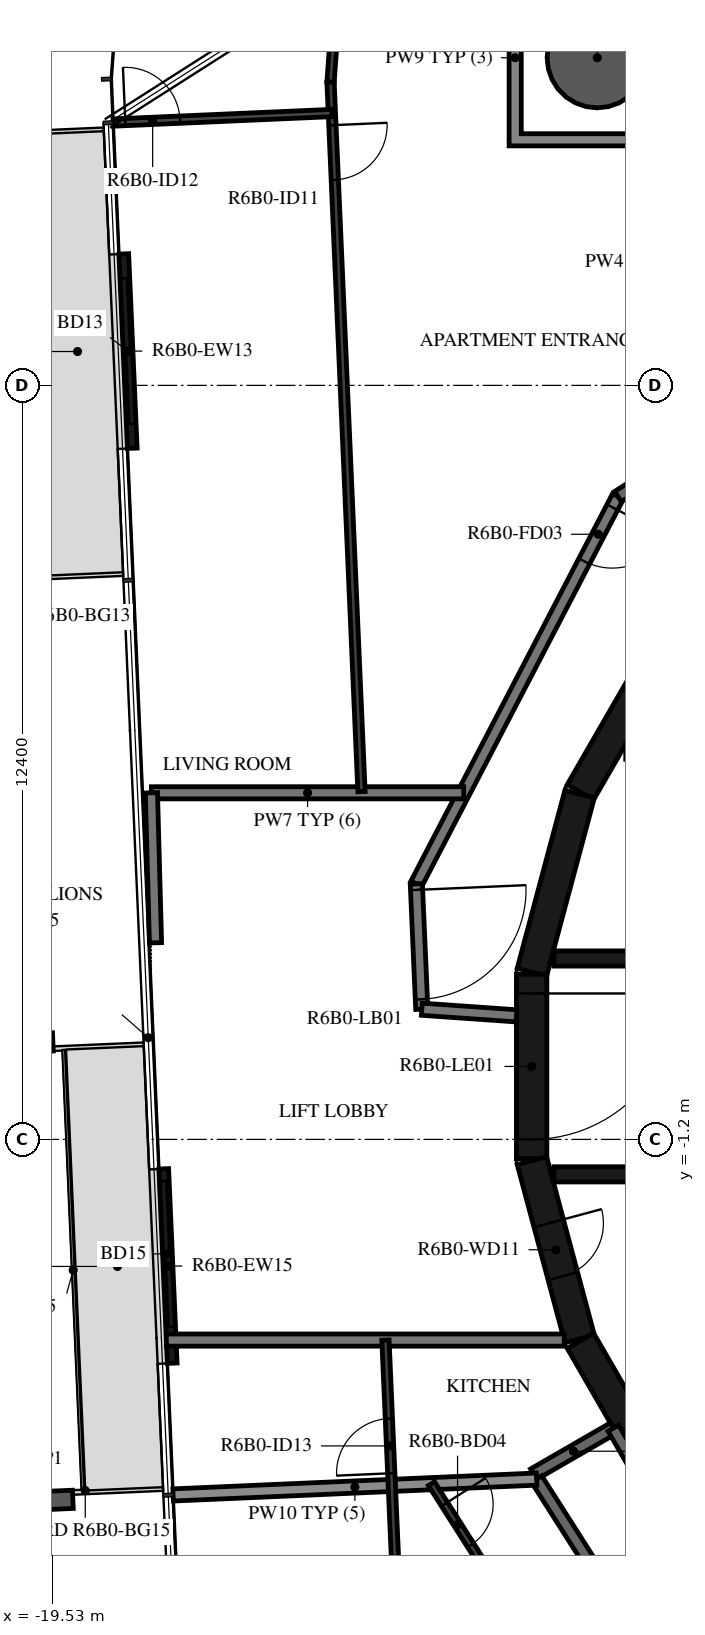
"""IFC4 building model, lengths in metres.
Left out: names, types, materials, properties, quantities, classifications, styles, units other than length and angle.
Written with IfcOpenShell. Run it as: python <this file> out.ifc"""

import sys

from ifc_helpers import new_model, si_unit, direction, frame, frame_2d, origin, origin_2d, place, context, subcontext, project, spatial, polyline, rectangle, hollow_circle, i_section, outline, extrude, element, fill, save


model = new_model("IFC4")
c1 = context("Model", 3, precision=1e-05, world=origin(), true_north=direction((0.0, 1.0)))
c2 = subcontext(c1, "Body", "Model", "MODEL_VIEW")
j1 = project(units=[si_unit("LENGTHUNIT", "METRE"), si_unit("PLANEANGLEUNIT", "RADIAN")], contexts=[c1])
p1 = place(None, origin())
s1 = spatial("IfcSite", under=j1, at=p1, CompositionType="ELEMENT")
p2 = place(p1, origin())
s2 = spatial("IfcBuilding", under=s1, at=p2, CompositionType="ELEMENT")
p3 = place(p2, frame((0.0, 0.0, 240.7)))
s3 = spatial("IfcBuildingStorey", under=s2, at=p3, CompositionType="ELEMENT", Elevation=240.7)
p4 = place(p3, frame((-10.568, 16.588, -0.38), z_axis=(0.0, 0.0, 1.0), x_axis=(1.0, 0.0, 0.0)))
e1 = element("IfcColumn", 1, at=p4, inside=s3, PredefinedType="COLUMN", context=c2, shape_type="SweptSolid", body=[
    extrude(hollow_circle(Radius=0.825, WallThickness=0.04, at=origin_2d()), origin(), (0.0, 0.0, 1.0), 3.5),
])
for number, where, z_axis, x_axis in (
    (2, (-19.97, 0.384, -0.38), (0.0, 0.0, 1.0), (-0.044, 0.999, 0.0)),
    (3, (-19.642, -7.139, -0.38), (0.0, 0.0, 1.0), (-0.044, 0.999, 0.0)),
):
    element("IfcColumn", number, at=place(p3, frame(where, z_axis=z_axis, x_axis=x_axis)), inside=s3, PredefinedType="COLUMN", context=c2, shape_type="SweptSolid", body=[
        extrude(i_section(OverallWidth=0.3, OverallDepth=0.9, WebThickness=0.019, FlangeThickness=0.035, FilletRadius=0.03, at=origin_2d()), origin(), (0.0, 0.0, 1.0), 3.5),
    ])
p5 = place(p3, frame((-18.355, 13.362, 0.0), z_axis=(0.0, 0.0, 1.0), x_axis=(0.043639181999, -0.999047357133, 0.0)))
e4 = element("IfcWall", 4, at=p5, inside=s3, PredefinedType="STANDARD", context=c2, shape_type="SweptSolid", body=[
    extrude(rectangle(XDim=3.2, YDim=0.16, at=frame_2d((1.6, 0.0))), origin(), (0.0, 0.0, 1.0), 3.12),
])
p6 = place(p5, frame((0.4, 0.0, 0.0)))
e5 = element("IfcOpeningElement", 5, at=p6, cuts=e4, PredefinedType="OPENING", context=c2, shape_type="SweptSolid", body=[
    extrude(rectangle(XDim=2.4, YDim=2.4, at=frame_2d((1.2, 1.2))), frame((0.0, 0.09, 0.0), z_axis=(0.0, -1.0, 0.0), x_axis=(1.0, 0.0, 0.0)), (0.0, 0.0, 1.0), 0.18),
])
p7 = place(p3, frame((-17.698, -1.684, 0.0), z_axis=(0.0, 0.0, 1.0), x_axis=(0.043639181999, -0.999047357133, 0.0)))
e6 = element("IfcWall", 6, at=p7, inside=s3, PredefinedType="STANDARD", context=c2, shape_type="SweptSolid", body=[
    extrude(rectangle(XDim=3.2, YDim=0.16, at=frame_2d((1.6, 0.0))), origin(), (0.0, 0.0, 1.0), 3.12),
])
p8 = place(p7, frame((0.2, 0.0, 0.0)))
e7 = element("IfcOpeningElement", 7, at=p8, cuts=e6, PredefinedType="OPENING", context=c2, shape_type="SweptSolid", body=[
    extrude(rectangle(XDim=2.4, YDim=2.4, at=frame_2d((1.2, 1.2))), frame((0.0, 0.09, 0.0), z_axis=(0.0, -1.0, 0.0), x_axis=(1.0, 0.0, 0.0)), (0.0, 0.0, 1.0), 0.18),
])
for number, where, z_axis, x_axis in (
    (8, (-9.329, 7.137, 0.0), (0.0, 0.0, 1.0), (-0.5, -0.866, 0.0)),
    (9, (-10.858, 4.479, 0.0), (0.0, 0.0, 1.0), (-0.259, -0.966, 0.0)),
):
    element("IfcWall", number, at=place(p3, frame(where, z_axis=z_axis, x_axis=x_axis)), inside=s3, PredefinedType="SHEAR", context=c2, shape_type="SweptSolid", body=[
        extrude(rectangle(XDim=3.033, YDim=0.5, at=frame_2d((1.516, 0.0))), origin(), (0.0, 0.0, 1.0), 3.12),
    ])
p9 = place(p3, frame((-11.647, 1.516, 0.0), z_axis=(0.0, 0.0, 1.0), x_axis=(0.0, -1.0, 0.0)))
e10 = element("IfcWall", 10, at=p9, inside=s3, PredefinedType="SHEAR", context=c2, shape_type="SweptSolid", body=[
    extrude(rectangle(XDim=3.033, YDim=0.5, at=frame_2d((1.516, 0.0))), origin(), (0.0, 0.0, 1.0), 3.12),
])
p10 = place(p9, frame((0.316, 0.0, 0.0)))
e11 = element("IfcOpeningElement", 11, at=p10, cuts=e10, PredefinedType="OPENING", context=c2, shape_type="SweptSolid", body=[
    extrude(rectangle(XDim=2.4, YDim=2.1, at=frame_2d((1.2, 1.05))), frame((0.0, 0.26, 0.0), z_axis=(0.0, -1.0, 0.0), x_axis=(1.0, 0.0, 0.0)), (0.0, 0.0, 1.0), 0.52),
])
p11 = place(p3, frame((-11.643, -1.55, 0.0), z_axis=(0.0, 0.0, 1.0), x_axis=(0.258734743916, -0.965948410781, 0.0)))
e12 = element("IfcWall", 12, at=p11, inside=s3, PredefinedType="SHEAR", context=c2, shape_type="SweptSolid", body=[
    extrude(rectangle(XDim=3.033, YDim=0.5, at=frame_2d((1.516, 0.0))), origin(), (0.0, 0.0, 1.0), 3.12),
])
p12 = place(p11, frame((1.066, 0.0, 0.0)))
e13 = element("IfcOpeningElement", 13, at=p12, cuts=e12, PredefinedType="OPENING", context=c2, shape_type="SweptSolid", body=[
    extrude(rectangle(XDim=0.9, YDim=2.1, at=frame_2d((0.45, 1.05))), frame((0.0, 0.26, 0.0), z_axis=(0.0, -1.0, 0.0), x_axis=(1.0, 0.0, 0.0)), (0.0, 0.0, 1.0), 0.52),
])
p13 = place(p3, frame((-10.845, -4.51, 0.0), z_axis=(0.0, 0.0, 1.0), x_axis=(0.500087131594, -0.865975092491, 0.0)))
e14 = element("IfcWall", 14, at=p13, inside=s3, PredefinedType="SHEAR", context=c2, shape_type="SweptSolid", body=[
    extrude(rectangle(XDim=3.033, YDim=0.5, at=frame_2d((1.516, 0.0))), origin(), (0.0, 0.0, 1.0), 3.12),
])
p14 = place(p3, frame((-11.28, 1.775, 0.0), z_axis=(0.0, 0.0, 1.0), x_axis=(1.0, 0.0, 0.0)))
e15 = element("IfcWall", 15, at=p14, inside=s3, PredefinedType="SHEAR", context=c2, shape_type="SweptSolid", body=[
    extrude(rectangle(XDim=14.38, YDim=0.25, at=frame_2d((7.19, 0.0))), origin(), (0.0, 0.0, 1.0), 3.12),
])
p15 = place(p14, frame((10.73, 0.0, 0.0)))
e16 = element("IfcOpeningElement", 16, at=p15, cuts=e15, PredefinedType="OPENING", context=c2, shape_type="SweptSolid", body=[
    extrude(rectangle(XDim=1.1, YDim=2.1, at=frame_2d((0.55, 1.05))), frame((0.0, 0.135, 0.0), z_axis=(0.0, -1.0, 0.0), x_axis=(1.0, 0.0, 0.0)), (0.0, 0.0, 1.0), 0.27),
])
p16 = place(p14, frame((12.88, 0.0, 0.0)))
e17 = element("IfcOpeningElement", 17, at=p16, cuts=e15, PredefinedType="OPENING", context=c2, shape_type="SweptSolid", body=[
    extrude(rectangle(XDim=1.1, YDim=2.1, at=frame_2d((0.55, 1.05))), frame((0.0, 0.135, 0.0), z_axis=(0.0, -1.0, 0.0), x_axis=(1.0, 0.0, 0.0)), (0.0, 0.0, 1.0), 0.27),
])
p17 = place(p14, frame((3.305, 0.0, 0.0)))
e18 = element("IfcOpeningElement", 18, at=p17, cuts=e15, PredefinedType="OPENING", context=c2, shape_type="SweptSolid", body=[
    extrude(rectangle(XDim=0.9, YDim=2.1, at=frame_2d((0.45, 1.05))), frame((0.0, 0.135, 0.0), z_axis=(0.0, -1.0, 0.0), x_axis=(1.0, 0.0, 0.0)), (0.0, 0.0, 1.0), 0.27),
])
p18 = place(p14, frame((7.605, 0.0, 0.0)))
e19 = element("IfcOpeningElement", 19, at=p18, cuts=e15, PredefinedType="OPENING", context=c2, shape_type="SweptSolid", body=[
    extrude(rectangle(XDim=0.9, YDim=2.1, at=frame_2d((0.45, 1.05))), frame((0.0, 0.135, 0.0), z_axis=(0.0, -1.0, 0.0), x_axis=(1.0, 0.0, 0.0)), (0.0, 0.0, 1.0), 0.27),
])
p19 = place(p3, frame((-11.28, -1.775, 0.0), z_axis=(0.0, 0.0, 1.0), x_axis=(1.0, 0.0, 0.0)))
e20 = element("IfcWall", 20, at=p19, inside=s3, PredefinedType="SHEAR", context=c2, shape_type="SweptSolid", body=[
    extrude(rectangle(XDim=14.38, YDim=0.25, at=frame_2d((7.19, 0.0))), origin(), (0.0, 0.0, 1.0), 3.12),
])
p20 = place(p19, frame((12.88, 0.0, 0.0)))
e21 = element("IfcOpeningElement", 21, at=p20, cuts=e20, PredefinedType="OPENING", context=c2, shape_type="SweptSolid", body=[
    extrude(rectangle(XDim=1.1, YDim=2.1, at=frame_2d((0.55, 1.05))), frame((0.0, 0.135, 0.0), z_axis=(0.0, -1.0, 0.0), x_axis=(1.0, 0.0, 0.0)), (0.0, 0.0, 1.0), 0.27),
])
p21 = place(p19, frame((6.53, 0.0, 0.0)))
e22 = element("IfcOpeningElement", 22, at=p21, cuts=e20, PredefinedType="OPENING", context=c2, shape_type="SweptSolid", body=[
    extrude(rectangle(XDim=0.9, YDim=2.1, at=frame_2d((0.45, 1.05))), frame((0.0, 0.135, 0.0), z_axis=(0.0, -1.0, 0.0), x_axis=(1.0, 0.0, 0.0)), (0.0, 0.0, 1.0), 0.27),
])
p22 = place(p19, frame((8.68, 0.0, 0.0)))
e23 = element("IfcOpeningElement", 23, at=p22, cuts=e20, PredefinedType="OPENING", context=c2, shape_type="SweptSolid", body=[
    extrude(rectangle(XDim=0.9, YDim=2.1, at=frame_2d((0.45, 1.05))), frame((0.0, 0.135, 0.0), z_axis=(0.0, -1.0, 0.0), x_axis=(1.0, 0.0, 0.0)), (0.0, 0.0, 1.0), 0.27),
])
p23 = place(p19, frame((10.83, 0.0, 0.0)))
e24 = element("IfcOpeningElement", 24, at=p23, cuts=e20, PredefinedType="OPENING", context=c2, shape_type="SweptSolid", body=[
    extrude(rectangle(XDim=0.9, YDim=2.1, at=frame_2d((0.45, 1.05))), frame((0.0, 0.135, 0.0), z_axis=(0.0, -1.0, 0.0), x_axis=(1.0, 0.0, 0.0)), (0.0, 0.0, 1.0), 0.27),
])
p24 = place(p3, frame((-10.228, 9.372, 0.0), z_axis=(0.0, 0.0, 1.0), x_axis=(-0.461759464021, -0.887005184532, 0.0)))
e25 = element("IfcWall", 25, at=p24, inside=s3, PredefinedType="STANDARD", context=c2, shape_type="SweptSolid", body=[
    extrude(rectangle(XDim=7.181, YDim=0.2, at=frame_2d((3.591, 0.0))), origin(), (0.0, 0.0, 1.0), 3.12),
])
p25 = place(p24, frame((0.2, 0.0, 0.0)))
e26 = element("IfcOpeningElement", 26, at=p25, cuts=e25, PredefinedType="OPENING", context=c2, shape_type="SweptSolid", body=[
    extrude(rectangle(XDim=1.0, YDim=2.1, at=frame_2d((0.5, 1.05))), frame((0.0, 0.11, 0.0), z_axis=(0.0, -1.0, 0.0), x_axis=(1.0, 0.0, 0.0)), (0.0, 0.0, 1.0), 0.22),
])
p26 = place(p3, frame((-13.544, 3.003, 0.0), z_axis=(0.0, 0.0, 1.0), x_axis=(0.043652842459, -0.99904676034, 0.0)))
e27 = element("IfcWall", 27, at=p26, inside=s3, PredefinedType="STANDARD", context=c2, shape_type="SweptSolid", body=[
    extrude(rectangle(XDim=2.064, YDim=0.2, at=frame_2d((1.032, 0.0))), origin(), (0.0, 0.0, 1.0), 3.12),
])
p27 = place(p26, frame((0.1, 0.0, 0.0)))
e28 = element("IfcOpeningElement", 28, at=p27, cuts=e27, PredefinedType="OPENING", context=c2, shape_type="SweptSolid", body=[
    extrude(rectangle(XDim=1.8, YDim=2.1, at=frame_2d((0.9, 1.05))), frame((0.0, 0.11, 0.0), z_axis=(0.0, -1.0, 0.0), x_axis=(1.0, 0.0, 0.0)), (0.0, 0.0, 1.0), 0.22),
])
p28 = place(p3, frame((-13.454, 0.941, 0.0), z_axis=(0.0, 0.0, 1.0), x_axis=(0.99755155062, -0.069934997354, 0.0)))
e29 = element("IfcWall", 29, at=p28, inside=s3, PredefinedType="STANDARD", context=c2, shape_type="SweptSolid", body=[
    extrude(rectangle(XDim=1.561, YDim=0.2, at=frame_2d((0.78, 0.0))), origin(), (0.0, 0.0, 1.0), 3.12),
])
p29 = place(p3, frame((-4.172, 13.231, 0.0), z_axis=(0.0, 0.0, 1.0), x_axis=(-0.843388394728, -0.537304397561, 0.0)))
e30 = element("IfcWall", 30, at=p29, inside=s3, PredefinedType="STANDARD", context=c2, shape_type="SweptSolid", body=[
    extrude(rectangle(XDim=7.181, YDim=0.2, at=frame_2d((3.59, 0.0))), origin(), (0.0, 0.0, 1.0), 3.12),
])
p30 = place(p3, frame((-10.303, -5.949, 0.0), z_axis=(0.0, 0.0, 1.0), x_axis=(-0.866043382451, -0.499968858743, 0.0)))
e31 = element("IfcWall", 31, at=p30, inside=s3, PredefinedType="STANDARD", context=c2, shape_type="SweptSolid", body=[
    extrude(rectangle(XDim=1.515, YDim=0.2, at=frame_2d((0.758, 0.0))), origin(), (0.0, 0.0, 1.0), 3.12),
])
p31 = place(p3, frame((-9.52, -7.305, 0.0), z_axis=(0.0, 0.0, 1.0), x_axis=(-0.500028278809, 0.866009076391, 0.0)))
e32 = element("IfcWall", 32, at=p31, inside=s3, PredefinedType="STANDARD", context=c2, shape_type="SweptSolid", body=[
    extrude(rectangle(XDim=1.566, YDim=0.2, at=frame_2d((0.783, 0.0))), origin(), (0.0, 0.0, 1.0), 3.12),
])
p32 = place(p3, frame((-11.565, -6.786, 0.0), z_axis=(0.0, 0.0, 1.0), x_axis=(0.537297327359, -0.843392898958, 0.0)))
e33 = element("IfcWall", 33, at=p32, inside=s3, PredefinedType="STANDARD", context=c2, shape_type="SweptSolid", body=[
    extrude(rectangle(XDim=4.081, YDim=0.2, at=frame_2d((2.041, 0.0))), origin(), (0.0, 0.0, 1.0), 3.12),
])
p33 = place(p3, frame((-12.764, 4.5, 0.0), z_axis=(0.0, 0.0, 1.0), x_axis=(-1.0, 0.0, 0.0)))
e34 = element("IfcWall", 34, at=p33, inside=s3, PredefinedType="STANDARD", context=c2, shape_type="SweptSolid", body=[
    extrude(rectangle(XDim=5.135, YDim=0.2, at=frame_2d((2.568, 0.0))), origin(), (0.0, 0.0, 1.0), 3.12),
])
p34 = place(p3, frame((-17.9, 4.5, 0.0), z_axis=(0.0, 0.0, 1.0), x_axis=(0.027204178319, -0.999629897853, 0.0)))
e35 = element("IfcWall", 35, at=p34, inside=s3, PredefinedType="STANDARD", context=c2, shape_type="SweptSolid", body=[
    extrude(rectangle(XDim=2.468, YDim=0.2, at=frame_2d((1.234, 0.0))), origin(), (0.0, 0.0, 1.0), 3.12),
])
p35 = place(p3, frame((-17.655, -4.5, 0.0), z_axis=(0.0, 0.0, 1.0), x_axis=(1.0, 0.0, 0.0)))
e36 = element("IfcWall", 36, at=p35, inside=s3, PredefinedType="STANDARD", context=c2, shape_type="SweptSolid", body=[
    extrude(rectangle(XDim=6.543, YDim=0.2, at=frame_2d((3.272, 0.0))), origin(), (0.0, 0.0, 1.0), 3.12),
])
p36 = place(p3, frame((-17.544, -7.047, 0.0), z_axis=(0.0, 0.0, 1.0), x_axis=(0.999046743906, 0.043653218555, 0.0)))
e37 = element("IfcWall", 37, at=p36, inside=s3, PredefinedType="STANDARD", context=c2, shape_type="SweptSolid", body=[
    extrude(rectangle(XDim=5.984, YDim=0.2, at=frame_2d((2.992, 0.0))), origin(), (0.0, 0.0, 1.0), 2.73),
])
p37 = place(p3, frame((-14.865, 17.411, 0.0), z_axis=(0.0, 0.0, 1.0), x_axis=(-0.072618457011, -0.997359794508, 0.0)))
e38 = element("IfcWall", 38, at=p37, inside=s3, PredefinedType="PARTITIONING", context=c2, shape_type="SweptSolid", body=[
    extrude(rectangle(XDim=1.227, YDim=0.12, at=frame_2d((0.614, 0.0))), origin(), (0.0, 0.0, 1.0), 3.12),
])
p38 = place(p3, frame((-14.955, 16.187, 0.0), z_axis=(0.0, 0.0, 1.0), x_axis=(0.04360777668, -0.999048728448, 0.0)))
e39 = element("IfcWall", 39, at=p38, inside=s3, PredefinedType="PARTITIONING", context=c2, shape_type="SweptSolid", body=[
    extrude(rectangle(XDim=11.679, YDim=0.12, at=frame_2d((5.839, 0.0))), origin(), (0.0, 0.0, 1.0), 3.12),
])
p39 = place(p38, frame((0.709, 0.0, 0.0)))
e40 = element("IfcOpeningElement", 40, at=p39, cuts=e39, PredefinedType="OPENING", context=c2, shape_type="SweptSolid", body=[
    extrude(rectangle(XDim=0.9, YDim=2.1, at=frame_2d((0.45, 1.05))), frame((0.0, 0.07, 0.0), z_axis=(0.0, -1.0, 0.0), x_axis=(1.0, 0.0, 0.0)), (0.0, 0.0, 1.0), 0.14),
])
p40 = place(p3, frame((-18.529, 15.522, 0.0), z_axis=(0.0, 0.0, 1.0), x_axis=(0.999048722018, 0.043607923987, 0.0)))
e41 = element("IfcWall", 41, at=p40, inside=s3, PredefinedType="PARTITIONING", context=c2, shape_type="SweptSolid", body=[
    extrude(rectangle(XDim=3.6, YDim=0.12, at=frame_2d((1.8, 0.0))), origin(), (0.0, 0.0, 1.0), 2.73),
])
p41 = place(p40, frame((0.2, 0.0, 0.0)))
e42 = element("IfcOpeningElement", 42, at=p41, cuts=e41, PredefinedType="OPENING", context=c2, shape_type="SweptSolid", body=[
    extrude(rectangle(XDim=0.9, YDim=2.1, at=frame_2d((0.45, 1.05))), frame((0.0, 0.07, 0.0), z_axis=(0.0, -1.0, 0.0), x_axis=(1.0, 0.0, 0.0)), (0.0, 0.0, 1.0), 0.14),
])
p42 = place(p3, frame((-13.487, -17.429, 0.0), z_axis=(0.0, 0.0, 1.0), x_axis=(-0.043617336945, 0.999048311103, 0.0)))
e43 = element("IfcWall", 43, at=p42, inside=s3, PredefinedType="PARTITIONING", context=c2, shape_type="SweptSolid", body=[
    extrude(rectangle(XDim=12.941, YDim=0.12, at=frame_2d((6.47, 0.0))), origin(), (0.0, 0.0, 1.0), 3.12),
])
p43 = place(p42, frame((10.749, 0.0, 0.0)))
e44 = element("IfcOpeningElement", 44, at=p43, cuts=e43, PredefinedType="OPENING", context=c2, shape_type="SweptSolid", body=[
    extrude(rectangle(XDim=0.9, YDim=2.1, at=frame_2d((0.45, 1.05))), frame((0.0, 0.07, 0.0), z_axis=(0.0, -1.0, 0.0), x_axis=(1.0, 0.0, 0.0)), (0.0, 0.0, 1.0), 0.14),
])
p44 = place(p42, frame((0.892, 0.0, 0.0)))
e45 = element("IfcOpeningElement", 45, at=p44, cuts=e43, PredefinedType="OPENING", context=c2, shape_type="SweptSolid", body=[
    extrude(rectangle(XDim=0.9, YDim=2.1, at=frame_2d((0.45, 1.05))), frame((0.0, 0.07, 0.0), z_axis=(0.0, -1.0, 0.0), x_axis=(1.0, 0.0, 0.0)), (0.0, 0.0, 1.0), 0.14),
])
p45 = place(p3, frame((-13.295, -6.862, 0.0), z_axis=(0.0, 0.0, 1.0), x_axis=(0.537285929223, -0.84340016022, 0.0)))
e46 = element("IfcWall", 46, at=p45, inside=s3, PredefinedType="PARTITIONING", context=c2, shape_type="SweptSolid", body=[
    extrude(rectangle(XDim=5.349, YDim=0.12, at=frame_2d((2.675, 0.0))), origin(), (0.0, 0.0, 1.0), 3.12),
])
p46 = place(p45, frame((0.4, 0.0, 0.0)))
e47 = element("IfcOpeningElement", 47, at=p46, cuts=e46, PredefinedType="OPENING", context=c2, shape_type="SweptSolid", body=[
    extrude(rectangle(XDim=0.8, YDim=2.1, at=frame_2d((0.4, 1.05))), frame((0.0, 0.07, 0.0), z_axis=(0.0, -1.0, 0.0), x_axis=(1.0, 0.0, 0.0)), (0.0, 0.0, 1.0), 0.14),
])
p47 = place(p3, origin())
e48 = element("IfcWall", 48, at=p47, inside=s3, PredefinedType="STANDARD", context=c2, shape_type="SweptSolid", body=[
    extrude(outline(polyline([(-9.118, 18.038), (-9.118, 15.138), (-12.018, 15.138), (-12.018, 18.038), (-9.118, 18.038)]), holes=[polyline([(-11.818, 15.338), (-9.318, 15.338), (-9.318, 17.838), (-11.818, 17.838), (-11.818, 15.338)])]), origin(), (0.0, 0.0, 1.0), 3.12),
])
p48 = place(p6, origin())
e49 = element("IfcDoor", 49, at=p48, inside=s3, OperationType="DOUBLE_DOOR_SLIDING", PredefinedType="DOOR", context=c2, shape_type="SweptSolid", body=[
    extrude(rectangle(XDim=2.4, YDim=2.4, at=frame_2d((1.2, 1.2))), frame((0.0, 0.025, 0.0), z_axis=(0.0, -1.0, 0.0), x_axis=(1.0, 0.0, 0.0)), (0.0, 0.0, 1.0), 0.05),
])
fill(e5, e49)
p49 = place(p8, origin())
e50 = element("IfcDoor", 50, at=p49, inside=s3, OperationType="DOUBLE_DOOR_SLIDING", PredefinedType="DOOR", context=c2, shape_type="SweptSolid", body=[
    extrude(rectangle(XDim=2.4, YDim=2.4, at=frame_2d((1.2, 1.2))), frame((0.0, 0.025, 0.0), z_axis=(0.0, -1.0, 0.0), x_axis=(1.0, 0.0, 0.0)), (0.0, 0.0, 1.0), 0.05),
])
fill(e7, e50)
p50 = place(p10, origin())
e51 = element("IfcDoor", 51, at=p50, inside=s3, OperationType="DOUBLE_DOOR_SINGLE_SWING", PredefinedType="DOOR", context=c2, shape_type="SweptSolid", body=[
    extrude(rectangle(XDim=2.4, YDim=2.1, at=frame_2d((1.2, 1.05))), frame((0.0, 0.025, 0.0), z_axis=(0.0, -1.0, 0.0), x_axis=(1.0, 0.0, 0.0)), (0.0, 0.0, 1.0), 0.05),
])
fill(e11, e51)
p51 = place(p12, origin())
e52 = element("IfcDoor", 52, at=p51, inside=s3, OperationType="SINGLE_SWING_LEFT", PredefinedType="DOOR", context=c2, shape_type="SweptSolid", body=[
    extrude(rectangle(XDim=0.9, YDim=2.1, at=frame_2d((0.45, 1.05))), frame((0.0, 0.025, 0.0), z_axis=(0.0, -1.0, 0.0), x_axis=(1.0, 0.0, 0.0)), (0.0, 0.0, 1.0), 0.05),
])
fill(e13, e52)
p52 = place(p25, origin())
e53 = element("IfcDoor", 53, at=p52, inside=s3, OperationType="SINGLE_SWING_LEFT", PredefinedType="DOOR", context=c2, shape_type="SweptSolid", body=[
    extrude(rectangle(XDim=1.0, YDim=2.1, at=frame_2d((0.5, 1.05))), frame((0.0, 0.025, 0.0), z_axis=(0.0, -1.0, 0.0), x_axis=(1.0, 0.0, 0.0)), (0.0, 0.0, 1.0), 0.05),
])
fill(e26, e53)
p53 = place(p39, origin())
e54 = element("IfcDoor", 54, at=p53, inside=s3, OperationType="SINGLE_SWING_LEFT", PredefinedType="DOOR", context=c2, shape_type="SweptSolid", body=[
    extrude(rectangle(XDim=0.9, YDim=2.1, at=frame_2d((0.45, 1.05))), frame((0.0, 0.025, 0.0), z_axis=(0.0, -1.0, 0.0), x_axis=(1.0, 0.0, 0.0)), (0.0, 0.0, 1.0), 0.05),
])
fill(e40, e54)
p54 = place(p41, origin())
e55 = element("IfcDoor", 55, at=p54, inside=s3, OperationType="SINGLE_SWING_LEFT", PredefinedType="DOOR", context=c2, shape_type="SweptSolid", body=[
    extrude(rectangle(XDim=0.9, YDim=2.1, at=frame_2d((0.45, 1.05))), frame((0.0, 0.025, 0.0), z_axis=(0.0, -1.0, 0.0), x_axis=(1.0, 0.0, 0.0)), (0.0, 0.0, 1.0), 0.05),
])
fill(e42, e55)
p55 = place(p43, origin())
e56 = element("IfcDoor", 56, at=p55, inside=s3, OperationType="SINGLE_SWING_LEFT", PredefinedType="DOOR", context=c2, shape_type="SweptSolid", body=[
    extrude(rectangle(XDim=0.9, YDim=2.1, at=frame_2d((0.45, 1.05))), frame((0.0, 0.025, 0.0), z_axis=(0.0, -1.0, 0.0), x_axis=(1.0, 0.0, 0.0)), (0.0, 0.0, 1.0), 0.05),
])
fill(e44, e56)
p56 = place(p46, origin())
e57 = element("IfcDoor", 57, at=p56, inside=s3, OperationType="SINGLE_SWING_RIGHT", PredefinedType="DOOR", context=c2, shape_type="SweptSolid", body=[
    extrude(rectangle(XDim=0.8, YDim=2.1, at=frame_2d((0.4, 1.05))), frame((0.0, 0.025, 0.0), z_axis=(0.0, -1.0, 0.0), x_axis=(1.0, 0.0, 0.0)), (0.0, 0.0, 1.0), 0.05),
])
fill(e47, e57)
p57 = place(p27, origin())
e58 = element("IfcDoor", 58, at=p57, inside=s3, OperationType="DOUBLE_DOOR_SINGLE_SWING", PredefinedType="DOOR", context=c2, shape_type="SweptSolid", body=[
    extrude(rectangle(XDim=1.8, YDim=2.1, at=frame_2d((0.9, 1.05))), frame((0.0, 0.025, 0.0), z_axis=(0.0, -1.0, 0.0), x_axis=(1.0, 0.0, 0.0)), (0.0, 0.0, 1.0), 0.05),
])
fill(e28, e58)
save(model, sys.argv[1])
